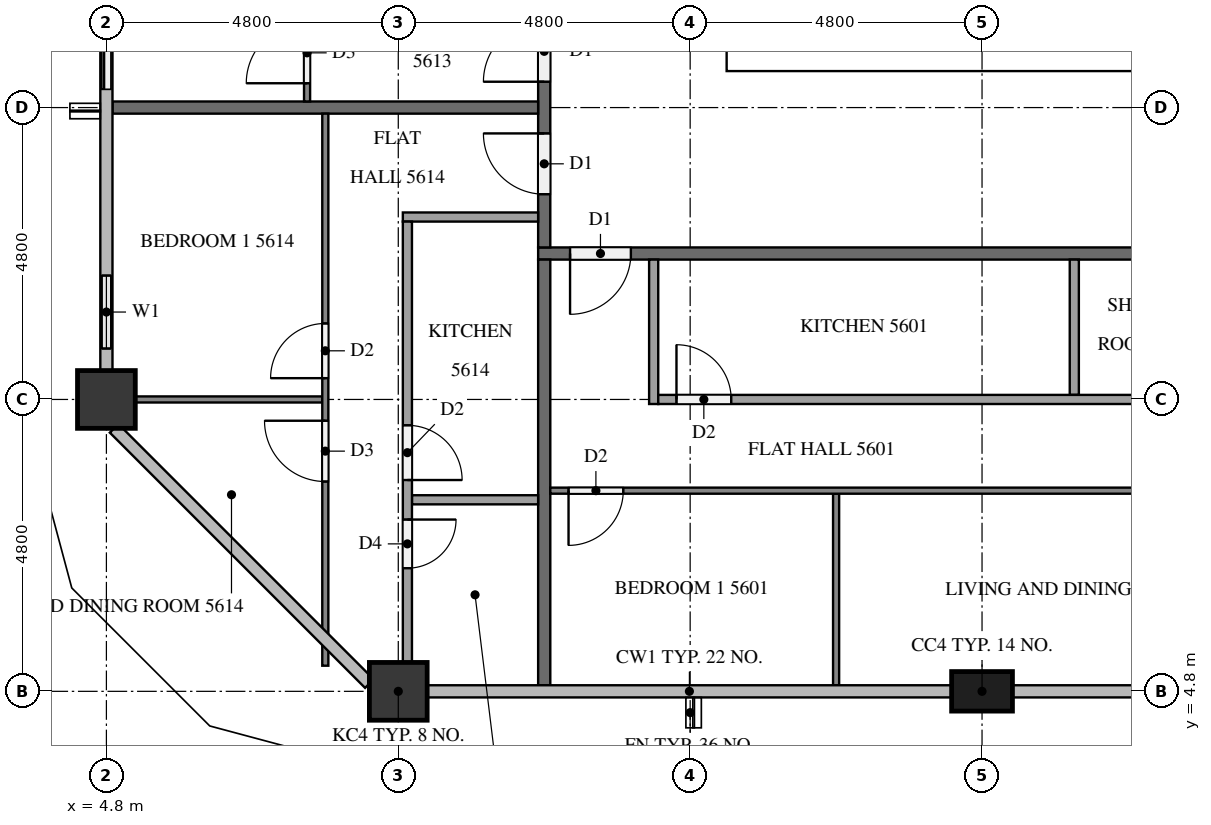
"""IFC4 building model, lengths in metres.
Left out: names, types, materials, properties, quantities, classifications, styles, units other than length and angle.
Written with IfcOpenShell. Run it as: python <this file> out.ifc"""

import sys

from ifc_helpers import new_model, si_unit, direction, frame, frame_2d, origin, origin_2d, place, context, subcontext, project, spatial, rectangle, extrude, element, fill, save


model = new_model("IFC4")
c1 = context("Model", 3, precision=1e-05, world=origin(), true_north=direction((0.0, 1.0)))
c2 = subcontext(c1, "Body", "Model", "MODEL_VIEW")
j1 = project(units=[si_unit("LENGTHUNIT", "METRE"), si_unit("PLANEANGLEUNIT", "RADIAN")], contexts=[c1])
p1 = place(None, origin())
s1 = spatial("IfcSite", under=j1, at=p1, CompositionType="ELEMENT")
p2 = place(p1, origin())
s2 = spatial("IfcBuilding", under=s1, at=p2, CompositionType="ELEMENT")
p3 = place(p2, frame((0.0, 0.0, 215.8)))
s3 = spatial("IfcBuildingStorey", under=s2, at=p3, CompositionType="ELEMENT", Elevation=215.8)
p4 = place(p3, frame((15.0, 15.35, 0.0), z_axis=(0.0, 0.0, 1.0), x_axis=(1.0, 0.0, 0.0)))
e1 = element("IfcWall", 1, at=p4, inside=s3, PredefinedType="SHEAR", context=c2, shape_type="SweptSolid", body=[
    extrude(rectangle(XDim=32.4, YDim=0.7, at=frame_2d((16.2, 0.0))), origin(), (0.0, 0.0, 1.0), 3.2),
])
p5 = place(p4, frame((15.3, 0.0, 0.0)))
e2 = element("IfcOpeningElement", 2, at=p5, cuts=e1, PredefinedType="OPENING", context=c2, shape_type="SweptSolid", body=[
    extrude(rectangle(XDim=1.8, YDim=2.1, at=frame_2d((0.9, 1.05))), frame((0.0, 0.36, 0.0), z_axis=(0.0, -1.0, 0.0), x_axis=(1.0, 0.0, 0.0)), (0.0, 0.0, 1.0), 0.72),
])
p6 = place(p3, frame((9.6, 4.8, 0.0), z_axis=(0.0, 0.0, 1.0), x_axis=(1.0, 0.0, 0.0)))
e3 = element("IfcColumn", 3, at=p6, inside=s3, PredefinedType="COLUMN", context=c2, shape_type="SweptSolid", body=[
    extrude(rectangle(XDim=0.95, YDim=0.95, at=origin_2d()), origin(), (0.0, 0.0, 1.0), 3.2),
])
p7 = place(p3, frame((19.2, 4.8, 0.0), z_axis=(0.0, 0.0, 1.0), x_axis=(1.0, 0.0, 0.0)))
e4 = element("IfcColumn", 4, at=p7, inside=s3, PredefinedType="COLUMN", context=c2, shape_type="SweptSolid", body=[
    extrude(rectangle(XDim=1.0, YDim=0.65, at=origin_2d()), origin(), (0.0, 0.0, 1.0), 3.2),
])
p8 = place(p3, frame((4.8, 9.6, 0.0), z_axis=(0.0, 0.0, 1.0), x_axis=(1.0, 0.0, 0.0)))
e5 = element("IfcColumn", 5, at=p8, inside=s3, PredefinedType="COLUMN", context=c2, shape_type="SweptSolid", body=[
    extrude(rectangle(XDim=0.95, YDim=0.95, at=origin_2d()), origin(), (0.0, 0.0, 1.0), 3.2),
])
p9 = place(p3, frame((21.6, 4.8, 0.0), z_axis=(0.0, 0.0, 1.0), x_axis=(1.0, 0.0, 0.0)))
e6 = element("IfcWall", 6, at=p9, inside=s3, PredefinedType="SOLIDWALL", context=c2, shape_type="SweptSolid", body=[
    extrude(rectangle(XDim=2.4, YDim=0.15, at=frame_2d((1.2, 0.0))), origin(), (0.0, 0.0, 1.0), 3.2),
])
p10 = place(p9, frame((0.3, 0.0, 0.0)))
e7 = element("IfcOpeningElement", 7, at=p10, cuts=e6, PredefinedType="OPENING", context=c2, shape_type="SweptSolid", body=[
    extrude(rectangle(XDim=1.8, YDim=2.4, at=frame_2d((0.9, 1.2))), frame((0.0, 0.085, 0.0), z_axis=(0.0, -1.0, 0.0), x_axis=(1.0, 0.0, 0.0)), (0.0, 0.0, 1.0), 0.17),
])
p11 = place(p3, frame((4.8, 16.8, 0.0), z_axis=(0.0, 0.0, 1.0), x_axis=(0.0, -1.0, 0.0)))
e8 = element("IfcWall", 8, at=p11, inside=s3, PredefinedType="SOLIDWALL", context=c2, shape_type="SweptSolid", body=[
    extrude(rectangle(XDim=2.4, YDim=0.15, at=frame_2d((1.2, 0.0))), origin(), (0.0, 0.0, 1.0), 3.2),
])
p12 = place(p11, frame((0.3, 0.0, 0.0)))
e9 = element("IfcOpeningElement", 9, at=p12, cuts=e8, PredefinedType="OPENING", context=c2, shape_type="SweptSolid", body=[
    extrude(rectangle(XDim=1.8, YDim=2.4, at=frame_2d((0.9, 1.2))), frame((0.0, 0.085, 0.0), z_axis=(0.0, -1.0, 0.0), x_axis=(1.0, 0.0, 0.0)), (0.0, 0.0, 1.0), 0.17),
])
p13 = place(p3, frame((4.8, 12.0, 0.0), z_axis=(0.0, 0.0, 1.0), x_axis=(0.0, -1.0, 0.0)))
e10 = element("IfcWall", 10, at=p13, inside=s3, PredefinedType="SOLIDWALL", context=c2, shape_type="SweptSolid", body=[
    extrude(rectangle(XDim=1.925, YDim=0.15, at=frame_2d((0.962, 0.0))), origin(), (0.0, 0.0, 1.0), 3.2),
])
p14 = place(p13, frame((0.363, 0.0, 0.9)))
e11 = element("IfcOpeningElement", 11, at=p14, cuts=e10, PredefinedType="OPENING", context=c2, shape_type="SweptSolid", body=[
    extrude(rectangle(XDim=1.2, YDim=1.4, at=frame_2d((0.6, 0.7))), frame((0.0, 0.085, 0.0), z_axis=(0.0, -1.0, 0.0), x_axis=(1.0, 0.0, 0.0)), (0.0, 0.0, 1.0), 0.17),
])
p15 = place(p3, frame((50.5, 12.0, 0.0), z_axis=(0.0, 0.0, 1.0), x_axis=(-1.0, 0.0, 0.0)))
e12 = element("IfcWall", 12, at=p15, inside=s3, PredefinedType="PARTITIONING", context=c2, shape_type="SweptSolid", body=[
    extrude(rectangle(XDim=38.6, YDim=0.2, at=frame_2d((19.3, 0.0))), origin(), (0.0, 0.0, 1.0), 3.2),
])
p16 = place(p15, frame((37.075, 0.0, 0.0)))
e13 = element("IfcOpeningElement", 13, at=p16, cuts=e12, PredefinedType="OPENING", context=c2, shape_type="SweptSolid", body=[
    extrude(rectangle(XDim=1.0, YDim=2.1, at=frame_2d((0.5, 1.05))), frame((0.0, 0.11, 0.0), z_axis=(0.0, -1.0, 0.0), x_axis=(1.0, 0.0, 0.0)), (0.0, 0.0, 1.0), 0.22),
])
p17 = place(p15, frame((20.275, 0.0, 0.0)))
e14 = element("IfcOpeningElement", 14, at=p17, cuts=e12, PredefinedType="OPENING", context=c2, shape_type="SweptSolid", body=[
    extrude(rectangle(XDim=1.0, YDim=2.1, at=frame_2d((0.5, 1.05))), frame((0.0, 0.11, 0.0), z_axis=(0.0, -1.0, 0.0), x_axis=(1.0, 0.0, 0.0)), (0.0, 0.0, 1.0), 0.22),
])
p18 = place(p15, frame((0.525, 0.0, 0.0)))
e15 = element("IfcOpeningElement", 15, at=p18, cuts=e12, PredefinedType="OPENING", context=c2, shape_type="SweptSolid", body=[
    extrude(rectangle(XDim=1.0, YDim=2.1, at=frame_2d((0.5, 1.05))), frame((0.0, 0.11, 0.0), z_axis=(0.0, -1.0, 0.0), x_axis=(1.0, 0.0, 0.0)), (0.0, 0.0, 1.0), 0.22),
])
p19 = place(p3, frame((12.0, 12.1, 0.0), z_axis=(0.0, 0.0, 1.0), x_axis=(0.0, 1.0, 0.0)))
e16 = element("IfcWall", 16, at=p19, inside=s3, PredefinedType="PARTITIONING", context=c2, shape_type="SweptSolid", body=[
    extrude(rectangle(XDim=28.6, YDim=0.2, at=frame_2d((14.3, 0.0))), origin(), (0.0, 0.0, 1.0), 3.2),
])
p20 = place(p19, frame((27.275, 0.0, 0.0)))
e17 = element("IfcOpeningElement", 17, at=p20, cuts=e16, PredefinedType="OPENING", context=c2, shape_type="SweptSolid", body=[
    extrude(rectangle(XDim=1.0, YDim=2.1, at=frame_2d((0.5, 1.05))), frame((0.0, 0.11, 0.0), z_axis=(0.0, -1.0, 0.0), x_axis=(1.0, 0.0, 0.0)), (0.0, 0.0, 1.0), 0.22),
])
p21 = place(p19, frame((12.325, 0.0, 0.0)))
e18 = element("IfcOpeningElement", 18, at=p21, cuts=e16, PredefinedType="OPENING", context=c2, shape_type="SweptSolid", body=[
    extrude(rectangle(XDim=1.0, YDim=2.1, at=frame_2d((0.5, 1.05))), frame((0.0, 0.11, 0.0), z_axis=(0.0, -1.0, 0.0), x_axis=(1.0, 0.0, 0.0)), (0.0, 0.0, 1.0), 0.22),
])
p22 = place(p19, frame((2.725, 0.0, 0.0)))
e19 = element("IfcOpeningElement", 19, at=p22, cuts=e16, PredefinedType="OPENING", context=c2, shape_type="SweptSolid", body=[
    extrude(rectangle(XDim=1.0, YDim=2.1, at=frame_2d((0.5, 1.05))), frame((0.0, 0.11, 0.0), z_axis=(0.0, -1.0, 0.0), x_axis=(1.0, 0.0, 0.0)), (0.0, 0.0, 1.0), 0.22),
])
p23 = place(p19, frame((0.875, 0.0, 0.0)))
e20 = element("IfcOpeningElement", 20, at=p23, cuts=e16, PredefinedType="OPENING", context=c2, shape_type="SweptSolid", body=[
    extrude(rectangle(XDim=1.0, YDim=2.1, at=frame_2d((0.5, 1.05))), frame((0.0, 0.11, 0.0), z_axis=(0.0, -1.0, 0.0), x_axis=(1.0, 0.0, 0.0)), (0.0, 0.0, 1.0), 0.22),
])
for number, where, z_axis, x_axis in (
    (21, (12.0, 4.9, 0.0), (0.0, 0.0, 1.0), (0.0, 1.0, 0.0)),
    (22, (4.9, 14.4, 0.0), (0.0, 0.0, 1.0), (1.0, 0.0, 0.0)),
):
    element("IfcWall", number, at=place(p3, frame(where, z_axis=z_axis, x_axis=x_axis)), inside=s3, PredefinedType="PARTITIONING", context=c2, shape_type="SweptSolid", body=[
        extrude(rectangle(XDim=7.0, YDim=0.2, at=frame_2d((3.5, 0.0))), origin(), (0.0, 0.0, 1.0), 3.2),
    ])
p24 = place(p3, frame((16.8, 8.05, 0.0), z_axis=(0.0, 0.0, 1.0), x_axis=(0.0, -1.0, 0.0)))
e23 = element("IfcWall", 23, at=p24, inside=s3, PredefinedType="PARTITIONING", context=c2, shape_type="SweptSolid", body=[
    extrude(rectangle(XDim=3.15, YDim=0.1, at=frame_2d((1.575, 0.0))), origin(), (0.0, 0.0, 1.0), 3.2),
])
p25 = place(p3, frame((28.7, 8.1, 0.0), z_axis=(0.0, 0.0, 1.0), x_axis=(-1.0, 0.0, 0.0)))
e24 = element("IfcWall", 24, at=p25, inside=s3, PredefinedType="PARTITIONING", context=c2, shape_type="SweptSolid", body=[
    extrude(rectangle(XDim=16.6, YDim=0.1, at=frame_2d((8.3, 0.0))), origin(), (0.0, 0.0, 1.0), 3.2),
])
p26 = place(p25, frame((15.4, 0.0, 0.0)))
e25 = element("IfcOpeningElement", 25, at=p26, cuts=e24, PredefinedType="OPENING", context=c2, shape_type="SweptSolid", body=[
    extrude(rectangle(XDim=0.9, YDim=2.1, at=frame_2d((0.45, 1.05))), frame((0.0, 0.06, 0.0), z_axis=(0.0, -1.0, 0.0), x_axis=(1.0, 0.0, 0.0)), (0.0, 0.0, 1.0), 0.12),
])
p27 = place(p25, frame((5.05, 0.0, 0.0)))
e26 = element("IfcOpeningElement", 26, at=p27, cuts=e24, PredefinedType="OPENING", context=c2, shape_type="SweptSolid", body=[
    extrude(rectangle(XDim=1.0, YDim=2.1, at=frame_2d((0.5, 1.05))), frame((0.0, 0.06, 0.0), z_axis=(0.0, -1.0, 0.0), x_axis=(1.0, 0.0, 0.0)), (0.0, 0.0, 1.0), 0.12),
])
p28 = place(p25, frame((3.45, 0.0, 0.0)))
e27 = element("IfcOpeningElement", 27, at=p28, cuts=e24, PredefinedType="OPENING", context=c2, shape_type="SweptSolid", body=[
    extrude(rectangle(XDim=0.9, YDim=2.1, at=frame_2d((0.45, 1.05))), frame((0.0, 0.06, 0.0), z_axis=(0.0, -1.0, 0.0), x_axis=(1.0, 0.0, 0.0)), (0.0, 0.0, 1.0), 0.12),
])
p29 = place(p3, frame((20.717, 11.9, 0.0), z_axis=(0.0, 0.0, 1.0), x_axis=(0.0, -1.0, 0.0)))
e28 = element("IfcWall", 28, at=p29, inside=s3, PredefinedType="PARTITIONING", context=c2, shape_type="SweptSolid", body=[
    extrude(rectangle(XDim=2.225, YDim=0.15, at=frame_2d((1.112, 0.0))), origin(), (0.0, 0.0, 1.0), 3.2),
])
p30 = place(p3, frame((13.8, 11.9, 0.0), z_axis=(0.0, 0.0, 1.0), x_axis=(0.0, -1.0, 0.0)))
e29 = element("IfcWall", 29, at=p30, inside=s3, PredefinedType="PARTITIONING", context=c2, shape_type="SweptSolid", body=[
    extrude(rectangle(XDim=2.375, YDim=0.15, at=frame_2d((1.188, 0.0))), origin(), (0.0, 0.0, 1.0), 3.2),
])
p31 = place(p3, frame((13.875, 9.6, 0.0), z_axis=(0.0, 0.0, 1.0), x_axis=(1.0, 0.0, 0.0)))
e30 = element("IfcWall", 30, at=p31, inside=s3, PredefinedType="PARTITIONING", context=c2, shape_type="SweptSolid", body=[
    extrude(rectangle(XDim=14.825, YDim=0.15, at=frame_2d((7.413, 0.0))), origin(), (0.0, 0.0, 1.0), 3.2),
])
p32 = place(p31, frame((0.3, 0.0, 0.0)))
e31 = element("IfcOpeningElement", 31, at=p32, cuts=e30, PredefinedType="OPENING", context=c2, shape_type="SweptSolid", body=[
    extrude(rectangle(XDim=0.9, YDim=2.1, at=frame_2d((0.45, 1.05))), frame((0.0, 0.085, 0.0), z_axis=(0.0, -1.0, 0.0), x_axis=(1.0, 0.0, 0.0)), (0.0, 0.0, 1.0), 0.17),
])
p33 = place(p31, frame((9.138, 0.0, 0.0)))
e32 = element("IfcOpeningElement", 32, at=p33, cuts=e30, PredefinedType="OPENING", context=c2, shape_type="SweptSolid", body=[
    extrude(rectangle(XDim=0.8, YDim=2.1, at=frame_2d((0.4, 1.05))), frame((0.0, 0.085, 0.0), z_axis=(0.0, -1.0, 0.0), x_axis=(1.0, 0.0, 0.0)), (0.0, 0.0, 1.0), 0.17),
])
p34 = place(p31, frame((10.588, 0.0, 0.0)))
e33 = element("IfcOpeningElement", 33, at=p34, cuts=e30, PredefinedType="OPENING", context=c2, shape_type="SweptSolid", body=[
    extrude(rectangle(XDim=0.9, YDim=2.1, at=frame_2d((0.45, 1.05))), frame((0.0, 0.085, 0.0), z_axis=(0.0, -1.0, 0.0), x_axis=(1.0, 0.0, 0.0)), (0.0, 0.0, 1.0), 0.17),
])
p35 = place(p3, frame((8.1, 14.5, 0.0), z_axis=(0.0, 0.0, 1.0), x_axis=(0.0, 1.0, 0.0)))
e34 = element("IfcWall", 34, at=p35, inside=s3, PredefinedType="PARTITIONING", context=c2, shape_type="SweptSolid", body=[
    extrude(rectangle(XDim=9.4, YDim=0.1, at=frame_2d((4.7, 0.0))), origin(), (0.0, 0.0, 1.0), 3.2),
])
p36 = place(p35, frame((0.3, 0.0, 0.0)))
e35 = element("IfcOpeningElement", 35, at=p36, cuts=e34, PredefinedType="OPENING", context=c2, shape_type="SweptSolid", body=[
    extrude(rectangle(XDim=1.0, YDim=2.1, at=frame_2d((0.5, 1.05))), frame((0.0, 0.06, 0.0), z_axis=(0.0, -1.0, 0.0), x_axis=(1.0, 0.0, 0.0)), (0.0, 0.0, 1.0), 0.12),
])
p37 = place(p35, frame((8.2, 0.0, 0.0)))
e36 = element("IfcOpeningElement", 36, at=p37, cuts=e34, PredefinedType="OPENING", context=c2, shape_type="SweptSolid", body=[
    extrude(rectangle(XDim=0.9, YDim=2.1, at=frame_2d((0.45, 1.05))), frame((0.0, 0.06, 0.0), z_axis=(0.0, -1.0, 0.0), x_axis=(1.0, 0.0, 0.0)), (0.0, 0.0, 1.0), 0.12),
])
p38 = place(p3, frame((8.35, 9.6, 0.0), z_axis=(0.0, 0.0, 1.0), x_axis=(-1.0, 0.0, 0.0)))
e37 = element("IfcWall", 37, at=p38, inside=s3, PredefinedType="PARTITIONING", context=c2, shape_type="SweptSolid", body=[
    extrude(rectangle(XDim=3.075, YDim=0.1, at=frame_2d((1.538, 0.0))), origin(), (0.0, 0.0, 1.0), 3.2),
])
p39 = place(p3, frame((8.4, 5.221, 0.0), z_axis=(0.0, 0.0, 1.0), x_axis=(0.0, 1.0, 0.0)))
e38 = element("IfcWall", 38, at=p39, inside=s3, PredefinedType="PARTITIONING", context=c2, shape_type="SweptSolid", body=[
    extrude(rectangle(XDim=9.079, YDim=0.1, at=frame_2d((4.539, 0.0))), origin(), (0.0, 0.0, 1.0), 3.2),
])
p40 = place(p39, frame((4.729, 0.0, 0.0)))
e39 = element("IfcOpeningElement", 39, at=p40, cuts=e38, PredefinedType="OPENING", context=c2, shape_type="SweptSolid", body=[
    extrude(rectangle(XDim=0.9, YDim=2.1, at=frame_2d((0.45, 1.05))), frame((0.0, 0.06, 0.0), z_axis=(0.0, -1.0, 0.0), x_axis=(1.0, 0.0, 0.0)), (0.0, 0.0, 1.0), 0.12),
])
p41 = place(p39, frame((3.029, 0.0, 0.0)))
e40 = element("IfcOpeningElement", 40, at=p41, cuts=e38, PredefinedType="OPENING", context=c2, shape_type="SweptSolid", body=[
    extrude(rectangle(XDim=1.0, YDim=2.1, at=frame_2d((0.5, 1.05))), frame((0.0, 0.06, 0.0), z_axis=(0.0, -1.0, 0.0), x_axis=(1.0, 0.0, 0.0)), (0.0, 0.0, 1.0), 0.12),
])
p42 = place(p3, frame((11.9, 7.95, 0.0), z_axis=(0.0, 0.0, 1.0), x_axis=(-1.0, 0.0, 0.0)))
e41 = element("IfcWall", 41, at=p42, inside=s3, PredefinedType="PARTITIONING", context=c2, shape_type="SweptSolid", body=[
    extrude(rectangle(XDim=2.075, YDim=0.15, at=frame_2d((1.038, 0.0))), origin(), (0.0, 0.0, 1.0), 3.2),
])
p43 = place(p3, frame((11.9, 12.6, 0.0), z_axis=(0.0, 0.0, 1.0), x_axis=(-1.0, 0.0, 0.0)))
e42 = element("IfcWall", 42, at=p43, inside=s3, PredefinedType="PARTITIONING", context=c2, shape_type="SweptSolid", body=[
    extrude(rectangle(XDim=2.225, YDim=0.15, at=frame_2d((1.112, 0.0))), origin(), (0.0, 0.0, 1.0), 3.2),
])
p44 = place(p3, frame((9.75, 12.525, 0.0), z_axis=(0.0, 0.0, 1.0), x_axis=(0.0, -1.0, 0.0)))
e43 = element("IfcWall", 43, at=p44, inside=s3, PredefinedType="PARTITIONING", context=c2, shape_type="SweptSolid", body=[
    extrude(rectangle(XDim=7.25, YDim=0.15, at=frame_2d((3.625, 0.0))), origin(), (0.0, 0.0, 1.0), 3.2),
])
p45 = place(p44, frame((3.35, 0.0, 0.0)))
e44 = element("IfcOpeningElement", 44, at=p45, cuts=e43, PredefinedType="OPENING", context=c2, shape_type="SweptSolid", body=[
    extrude(rectangle(XDim=0.9, YDim=2.1, at=frame_2d((0.45, 1.05))), frame((0.0, 0.085, 0.0), z_axis=(0.0, -1.0, 0.0), x_axis=(1.0, 0.0, 0.0)), (0.0, 0.0, 1.0), 0.17),
])
p46 = place(p44, frame((4.9, 0.0, 0.0)))
e45 = element("IfcOpeningElement", 45, at=p46, cuts=e43, PredefinedType="OPENING", context=c2, shape_type="SweptSolid", body=[
    extrude(rectangle(XDim=0.8, YDim=2.1, at=frame_2d((0.4, 1.05))), frame((0.0, 0.085, 0.0), z_axis=(0.0, -1.0, 0.0), x_axis=(1.0, 0.0, 0.0)), (0.0, 0.0, 1.0), 0.17),
])
p47 = place(p12, origin())
e46 = element("IfcDoor", 46, at=p47, inside=s3, OperationType="SLIDING_TO_RIGHT", PredefinedType="DOOR", context=c2, shape_type="SweptSolid", body=[
    extrude(rectangle(XDim=1.8, YDim=2.4, at=frame_2d((0.9, 1.2))), frame((0.0, 0.025, 0.0), z_axis=(0.0, -1.0, 0.0), x_axis=(1.0, 0.0, 0.0)), (0.0, 0.0, 1.0), 0.05),
])
fill(e9, e46)
p48 = place(p14, origin())
e47 = element("IfcWindow", 47, at=p48, inside=s3, PartitioningType="SINGLE_PANEL", PredefinedType="WINDOW", context=c2, shape_type="SweptSolid", body=[
    extrude(rectangle(XDim=1.2, YDim=1.4, at=frame_2d((0.6, 0.7))), frame((0.0, 0.03, 0.0), z_axis=(0.0, -1.0, 0.0), x_axis=(1.0, 0.0, 0.0)), (0.0, 0.0, 1.0), 0.06),
])
fill(e11, e47)
p49 = place(p16, origin())
e48 = element("IfcDoor", 48, at=p49, inside=s3, OperationType="SINGLE_SWING_RIGHT", PredefinedType="DOOR", context=c2, shape_type="SweptSolid", body=[
    extrude(rectangle(XDim=1.0, YDim=2.1, at=frame_2d((0.5, 1.05))), frame((0.0, 0.025, 0.0), z_axis=(0.0, -1.0, 0.0), x_axis=(1.0, 0.0, 0.0)), (0.0, 0.0, 1.0), 0.05),
])
fill(e13, e48)
p50 = place(p22, origin())
e49 = element("IfcDoor", 49, at=p50, inside=s3, OperationType="SINGLE_SWING_LEFT", PredefinedType="DOOR", context=c2, shape_type="SweptSolid", body=[
    extrude(rectangle(XDim=1.0, YDim=2.1, at=frame_2d((0.5, 1.05))), frame((0.0, 0.025, 0.0), z_axis=(0.0, -1.0, 0.0), x_axis=(1.0, 0.0, 0.0)), (0.0, 0.0, 1.0), 0.05),
])
fill(e19, e49)
p51 = place(p23, origin())
e50 = element("IfcDoor", 50, at=p51, inside=s3, OperationType="SINGLE_SWING_RIGHT", PredefinedType="DOOR", context=c2, shape_type="SweptSolid", body=[
    extrude(rectangle(XDim=1.0, YDim=2.1, at=frame_2d((0.5, 1.05))), frame((0.0, 0.025, 0.0), z_axis=(0.0, -1.0, 0.0), x_axis=(1.0, 0.0, 0.0)), (0.0, 0.0, 1.0), 0.05),
])
fill(e20, e50)
p52 = place(p26, origin())
e51 = element("IfcDoor", 51, at=p52, inside=s3, OperationType="SINGLE_SWING_RIGHT", PredefinedType="DOOR", context=c2, shape_type="SweptSolid", body=[
    extrude(rectangle(XDim=0.9, YDim=2.1, at=frame_2d((0.45, 1.05))), frame((0.0, 0.025, 0.0), z_axis=(0.0, -1.0, 0.0), x_axis=(1.0, 0.0, 0.0)), (0.0, 0.0, 1.0), 0.05),
])
fill(e25, e51)
p53 = place(p32, origin())
e52 = element("IfcDoor", 52, at=p53, inside=s3, OperationType="SINGLE_SWING_LEFT", PredefinedType="DOOR", context=c2, shape_type="SweptSolid", body=[
    extrude(rectangle(XDim=0.9, YDim=2.1, at=frame_2d((0.45, 1.05))), frame((0.0, 0.025, 0.0), z_axis=(0.0, -1.0, 0.0), x_axis=(1.0, 0.0, 0.0)), (0.0, 0.0, 1.0), 0.05),
])
fill(e31, e52)
p54 = place(p36, origin())
e53 = element("IfcDoor", 53, at=p54, inside=s3, OperationType="SINGLE_SWING_LEFT", PredefinedType="DOOR", context=c2, shape_type="SweptSolid", body=[
    extrude(rectangle(XDim=1.0, YDim=2.1, at=frame_2d((0.5, 1.05))), frame((0.0, 0.025, 0.0), z_axis=(0.0, -1.0, 0.0), x_axis=(1.0, 0.0, 0.0)), (0.0, 0.0, 1.0), 0.05),
])
fill(e35, e53)
p55 = place(p40, origin())
e54 = element("IfcDoor", 54, at=p55, inside=s3, OperationType="SINGLE_SWING_LEFT", PredefinedType="DOOR", context=c2, shape_type="SweptSolid", body=[
    extrude(rectangle(XDim=0.9, YDim=2.1, at=frame_2d((0.45, 1.05))), frame((0.0, 0.025, 0.0), z_axis=(0.0, -1.0, 0.0), x_axis=(1.0, 0.0, 0.0)), (0.0, 0.0, 1.0), 0.05),
])
fill(e39, e54)
p56 = place(p41, origin())
e55 = element("IfcDoor", 55, at=p56, inside=s3, OperationType="SINGLE_SWING_RIGHT", PredefinedType="DOOR", context=c2, shape_type="SweptSolid", body=[
    extrude(rectangle(XDim=1.0, YDim=2.1, at=frame_2d((0.5, 1.05))), frame((0.0, 0.025, 0.0), z_axis=(0.0, -1.0, 0.0), x_axis=(1.0, 0.0, 0.0)), (0.0, 0.0, 1.0), 0.05),
])
fill(e40, e55)
p57 = place(p45, origin())
e56 = element("IfcDoor", 56, at=p57, inside=s3, OperationType="SINGLE_SWING_RIGHT", PredefinedType="DOOR", context=c2, shape_type="SweptSolid", body=[
    extrude(rectangle(XDim=0.9, YDim=2.1, at=frame_2d((0.45, 1.05))), frame((0.0, 0.025, 0.0), z_axis=(0.0, -1.0, 0.0), x_axis=(1.0, 0.0, 0.0)), (0.0, 0.0, 1.0), 0.05),
])
fill(e44, e56)
p58 = place(p46, origin())
e57 = element("IfcDoor", 57, at=p58, inside=s3, OperationType="SINGLE_SWING_LEFT", PredefinedType="DOOR", context=c2, shape_type="SweptSolid", body=[
    extrude(rectangle(XDim=0.8, YDim=2.1, at=frame_2d((0.4, 1.05))), frame((0.0, 0.025, 0.0), z_axis=(0.0, -1.0, 0.0), x_axis=(1.0, 0.0, 0.0)), (0.0, 0.0, 1.0), 0.05),
])
fill(e45, e57)
save(model, sys.argv[1])
